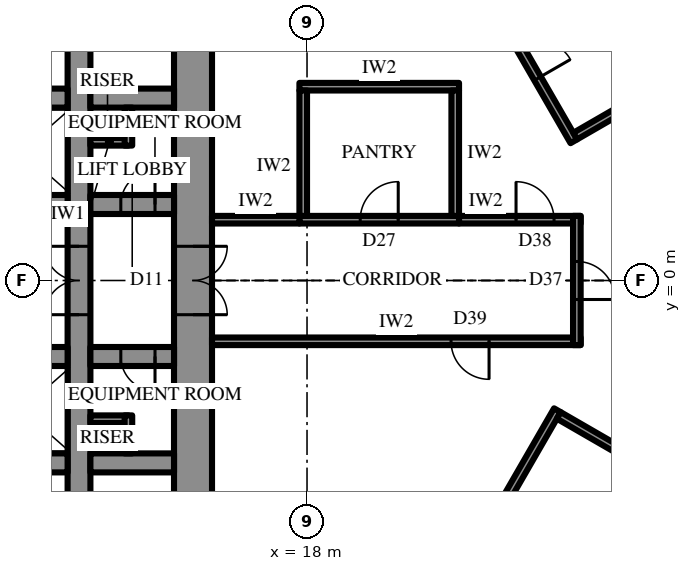
"""IFC4 building model, lengths in metres.
Left out: names, types, materials, properties, quantities, classifications, styles, units other than length and angle.
Written with IfcOpenShell. Run it as: python <this file> out.ifc"""

import sys

from ifc_helpers import new_model, si_unit, direction, frame, frame_2d, origin, place, context, subcontext, project, spatial, rectangle, extrude, element, fill, save


model = new_model("IFC4")
c1 = context("Model", 3, precision=1e-05, world=origin(), true_north=direction((0.0, 1.0)))
c2 = subcontext(c1, "Body", "Model", "MODEL_VIEW")
j1 = project(units=[si_unit("LENGTHUNIT", "METRE"), si_unit("PLANEANGLEUNIT", "RADIAN")], contexts=[c1])
p1 = place(None, origin())
s1 = spatial("IfcSite", under=j1, at=p1, CompositionType="ELEMENT")
p2 = place(p1, origin())
s2 = spatial("IfcBuilding", under=s1, at=p2, CompositionType="ELEMENT")
p3 = place(p2, frame((0.0, 0.0, 261.7)))
s3 = spatial("IfcBuildingStorey", under=s2, at=p3, CompositionType="ELEMENT", Elevation=261.7)
p4 = place(p3, frame((15.0, -10.7, 0.0), z_axis=(0.0, 0.0, 1.0), x_axis=(0.0, 1.0, 0.0)))
e1 = element("IfcWall", 1, at=p4, inside=s3, PredefinedType="SHEAR", context=c2, shape_type="SweptSolid", body=[
    extrude(rectangle(XDim=21.4, YDim=1.0, at=frame_2d((10.7, 0.0))), origin(), (0.0, 0.0, 1.0), 4.2),
])
p5 = place(p4, frame((9.8, 0.0, 0.0)))
e2 = element("IfcOpeningElement", 2, at=p5, cuts=e1, PredefinedType="OPENING", context=c2, shape_type="SweptSolid", body=[
    extrude(rectangle(XDim=1.8, YDim=2.4, at=frame_2d((0.9, 1.2))), frame((0.0, 0.51, 0.0), z_axis=(0.0, -1.0, 0.0), x_axis=(1.0, 0.0, 0.0)), (0.0, 0.0, 1.0), 1.02),
])
p6 = place(p3, frame((12.0, -10.7, 0.0), z_axis=(0.0, 0.0, 1.0), x_axis=(0.0, 1.0, 0.0)))
e3 = element("IfcWall", 3, at=p6, inside=s3, PredefinedType="SHEAR", context=c2, shape_type="SweptSolid", body=[
    extrude(rectangle(XDim=21.4, YDim=0.6, at=frame_2d((10.7, 0.0))), origin(), (0.0, 0.0, 1.0), 4.2),
])
p7 = place(p6, frame((9.8, 0.0, 0.0)))
e4 = element("IfcOpeningElement", 4, at=p7, cuts=e3, PredefinedType="OPENING", context=c2, shape_type="SweptSolid", body=[
    extrude(rectangle(XDim=1.8, YDim=2.4, at=frame_2d((0.9, 1.2))), frame((0.0, 0.31, 0.0), z_axis=(0.0, -1.0, 0.0), x_axis=(1.0, 0.0, 0.0)), (0.0, 0.0, 1.0), 0.62),
])
p8 = place(p3, frame((-3.2, 2.0, 0.0), z_axis=(0.0, 0.0, 1.0), x_axis=(1.0, 0.0, 0.0)))
e5 = element("IfcWall", 5, at=p8, inside=s3, PredefinedType="SHEAR", context=c2, shape_type="SweptSolid", body=[
    extrude(rectangle(XDim=14.9, YDim=0.5, at=frame_2d((7.45, 0.0))), origin(), (0.0, 0.0, 1.0), 4.2),
])
p9 = place(p8, frame((1.15, 0.0, 0.0)))
e6 = element("IfcOpeningElement", 6, at=p9, cuts=e5, PredefinedType="OPENING", context=c2, shape_type="SweptSolid", body=[
    extrude(rectangle(XDim=1.1, YDim=2.2, at=frame_2d((0.55, 1.1))), frame((0.0, 0.26, 0.0), z_axis=(0.0, -1.0, 0.0), x_axis=(1.0, 0.0, 0.0)), (0.0, 0.0, 1.0), 0.52),
])
p10 = place(p8, frame((4.15, 0.0, 0.0)))
e7 = element("IfcOpeningElement", 7, at=p10, cuts=e5, PredefinedType="OPENING", context=c2, shape_type="SweptSolid", body=[
    extrude(rectangle(XDim=1.1, YDim=2.2, at=frame_2d((0.55, 1.1))), frame((0.0, 0.26, 0.0), z_axis=(0.0, -1.0, 0.0), x_axis=(1.0, 0.0, 0.0)), (0.0, 0.0, 1.0), 0.52),
])
p11 = place(p8, frame((7.15, 0.0, 0.0)))
e8 = element("IfcOpeningElement", 8, at=p11, cuts=e5, PredefinedType="OPENING", context=c2, shape_type="SweptSolid", body=[
    extrude(rectangle(XDim=1.1, YDim=2.2, at=frame_2d((0.55, 1.1))), frame((0.0, 0.26, 0.0), z_axis=(0.0, -1.0, 0.0), x_axis=(1.0, 0.0, 0.0)), (0.0, 0.0, 1.0), 0.52),
])
p12 = place(p8, frame((10.15, 0.0, 0.0)))
e9 = element("IfcOpeningElement", 9, at=p12, cuts=e5, PredefinedType="OPENING", context=c2, shape_type="SweptSolid", body=[
    extrude(rectangle(XDim=1.1, YDim=2.2, at=frame_2d((0.55, 1.1))), frame((0.0, 0.26, 0.0), z_axis=(0.0, -1.0, 0.0), x_axis=(1.0, 0.0, 0.0)), (0.0, 0.0, 1.0), 0.52),
])
p13 = place(p3, frame((12.3, 2.0, 0.0), z_axis=(0.0, 0.0, 1.0), x_axis=(1.0, 0.0, 0.0)))
e10 = element("IfcWall", 10, at=p13, inside=s3, PredefinedType="SHEAR", context=c2, shape_type="SweptSolid", body=[
    extrude(rectangle(XDim=2.2, YDim=0.5, at=frame_2d((1.1, 0.0))), origin(), (0.0, 0.0, 1.0), 4.2),
])
p14 = place(p13, frame((0.8, 0.0, 0.0)))
e11 = element("IfcOpeningElement", 11, at=p14, cuts=e10, PredefinedType="OPENING", context=c2, shape_type="SweptSolid", body=[
    extrude(rectangle(XDim=0.9, YDim=2.2, at=frame_2d((0.45, 1.1))), frame((0.0, 0.26, 0.0), z_axis=(0.0, -1.0, 0.0), x_axis=(1.0, 0.0, 0.0)), (0.0, 0.0, 1.0), 0.52),
])
p15 = place(p3, frame((-11.7, 4.8, 0.0), z_axis=(0.0, 0.0, 1.0), x_axis=(1.0, 0.0, 0.0)))
e12 = element("IfcWall", 12, at=p15, inside=s3, PredefinedType="SHEAR", context=c2, shape_type="SweptSolid", body=[
    extrude(rectangle(XDim=23.4, YDim=0.5, at=frame_2d((11.7, 0.0))), origin(), (0.0, 0.0, 1.0), 4.2),
])
p16 = place(p15, frame((6.6, 0.0, 0.0)))
e13 = element("IfcOpeningElement", 13, at=p16, cuts=e12, PredefinedType="OPENING", context=c2, shape_type="SweptSolid", body=[
    extrude(rectangle(XDim=1.2, YDim=2.2, at=frame_2d((0.6, 1.1))), frame((0.0, 0.26, 0.0), z_axis=(0.0, -1.0, 0.0), x_axis=(1.0, 0.0, 0.0)), (0.0, 0.0, 1.0), 0.52),
])
p17 = place(p15, frame((3.6, 0.0, 0.0)))
e14 = element("IfcOpeningElement", 14, at=p17, cuts=e12, PredefinedType="OPENING", context=c2, shape_type="SweptSolid", body=[
    extrude(rectangle(XDim=1.2, YDim=2.2, at=frame_2d((0.6, 1.1))), frame((0.0, 0.26, 0.0), z_axis=(0.0, -1.0, 0.0), x_axis=(1.0, 0.0, 0.0)), (0.0, 0.0, 1.0), 0.52),
])
p18 = place(p3, frame((12.3, 4.8, 0.0), z_axis=(0.0, 0.0, 1.0), x_axis=(1.0, 0.0, 0.0)))
e15 = element("IfcWall", 15, at=p18, inside=s3, PredefinedType="SHEAR", context=c2, shape_type="SweptSolid", body=[
    extrude(rectangle(XDim=2.2, YDim=0.5, at=frame_2d((1.1, 0.0))), origin(), (0.0, 0.0, 1.0), 4.2),
])
p19 = place(p3, frame((14.5, -2.0, 0.0), z_axis=(0.0, 0.0, 1.0), x_axis=(-1.0, 0.0, 0.0)))
e16 = element("IfcWall", 16, at=p19, inside=s3, PredefinedType="SHEAR", context=c2, shape_type="SweptSolid", body=[
    extrude(rectangle(XDim=2.2, YDim=0.5, at=frame_2d((1.1, 0.0))), origin(), (0.0, 0.0, 1.0), 4.2),
])
p20 = place(p19, frame((0.5, 0.0, 0.0)))
e17 = element("IfcOpeningElement", 17, at=p20, cuts=e16, PredefinedType="OPENING", context=c2, shape_type="SweptSolid", body=[
    extrude(rectangle(XDim=0.9, YDim=2.2, at=frame_2d((0.45, 1.1))), frame((0.0, 0.26, 0.0), z_axis=(0.0, -1.0, 0.0), x_axis=(1.0, 0.0, 0.0)), (0.0, 0.0, 1.0), 0.52),
])
p21 = place(p3, frame((11.7, -2.0, 0.0), z_axis=(0.0, 0.0, 1.0), x_axis=(-1.0, 0.0, 0.0)))
e18 = element("IfcWall", 18, at=p21, inside=s3, PredefinedType="SHEAR", context=c2, shape_type="SweptSolid", body=[
    extrude(rectangle(XDim=5.9, YDim=0.5, at=frame_2d((2.95, 0.0))), origin(), (0.0, 0.0, 1.0), 4.2),
])
p22 = place(p3, frame((14.5, -4.8, 0.0), z_axis=(0.0, 0.0, 1.0), x_axis=(-1.0, 0.0, 0.0)))
e19 = element("IfcWall", 19, at=p22, inside=s3, PredefinedType="SHEAR", context=c2, shape_type="SweptSolid", body=[
    extrude(rectangle(XDim=2.2, YDim=0.5, at=frame_2d((1.1, 0.0))), origin(), (0.0, 0.0, 1.0), 4.2),
])
p23 = place(p3, frame((11.7, -4.8, 0.0), z_axis=(0.0, 0.0, 1.0), x_axis=(-1.0, 0.0, 0.0)))
e20 = element("IfcWall", 20, at=p23, inside=s3, PredefinedType="SHEAR", context=c2, shape_type="SweptSolid", body=[
    extrude(rectangle(XDim=23.4, YDim=0.5, at=frame_2d((11.7, 0.0))), origin(), (0.0, 0.0, 1.0), 4.2),
])
p24 = place(p23, frame((6.6, 0.0, 0.0)))
e21 = element("IfcOpeningElement", 21, at=p24, cuts=e20, PredefinedType="OPENING", context=c2, shape_type="SweptSolid", body=[
    extrude(rectangle(XDim=1.2, YDim=2.2, at=frame_2d((0.6, 1.1))), frame((0.0, 0.26, 0.0), z_axis=(0.0, -1.0, 0.0), x_axis=(1.0, 0.0, 0.0)), (0.0, 0.0, 1.0), 0.52),
])
p25 = place(p23, frame((3.6, 0.0, 0.0)))
e22 = element("IfcOpeningElement", 22, at=p25, cuts=e20, PredefinedType="OPENING", context=c2, shape_type="SweptSolid", body=[
    extrude(rectangle(XDim=1.2, YDim=2.2, at=frame_2d((0.6, 1.1))), frame((0.0, 0.26, 0.0), z_axis=(0.0, -1.0, 0.0), x_axis=(1.0, 0.0, 0.0)), (0.0, 0.0, 1.0), 0.52),
])
p26 = place(p3, frame((18.707, -25.299, 0.0), z_axis=(0.0, 0.0, 1.0), x_axis=(0.500000442367, 0.866025148383, 0.0)))
e23 = element("IfcWall", 23, at=p26, inside=s3, PredefinedType="SOLIDWALL", context=c2, shape_type="SweptSolid", body=[
    extrude(rectangle(XDim=25.113, YDim=0.3, at=frame_2d((12.556, 0.0))), origin(), (0.0, 0.0, 1.0), 2.8),
])
p27 = place(p26, frame((4.278, 0.0, 0.6)))
e24 = element("IfcOpeningElement", 24, at=p27, cuts=e23, PredefinedType="OPENING", context=c2, shape_type="SweptSolid", body=[
    extrude(rectangle(XDim=2.7, YDim=1.95, at=frame_2d((1.35, 0.975))), frame((0.0, 0.16, 0.0), z_axis=(0.0, -1.0, 0.0), x_axis=(1.0, 0.0, 0.0)), (0.0, 0.0, 1.0), 0.32),
])
p28 = place(p26, frame((9.647, 0.0, 0.0)))
e25 = element("IfcOpeningElement", 25, at=p28, cuts=e23, PredefinedType="OPENING", context=c2, shape_type="SweptSolid", body=[
    extrude(rectangle(XDim=1.2, YDim=2.4, at=frame_2d((0.6, 1.2))), frame((0.0, 0.16, 0.0), z_axis=(0.0, -1.0, 0.0), x_axis=(1.0, 0.0, 0.0)), (0.0, 0.0, 1.0), 0.32),
])
p29 = place(p26, frame((13.516, 0.0, 0.6)))
e26 = element("IfcOpeningElement", 26, at=p29, cuts=e23, PredefinedType="OPENING", context=c2, shape_type="SweptSolid", body=[
    extrude(rectangle(XDim=2.7, YDim=1.95, at=frame_2d((1.35, 0.975))), frame((0.0, 0.16, 0.0), z_axis=(0.0, -1.0, 0.0), x_axis=(1.0, 0.0, 0.0)), (0.0, 0.0, 1.0), 0.32),
])
p30 = place(p26, frame((18.135, 0.0, 0.6)))
e27 = element("IfcOpeningElement", 27, at=p30, cuts=e23, PredefinedType="OPENING", context=c2, shape_type="SweptSolid", body=[
    extrude(rectangle(XDim=2.7, YDim=1.95, at=frame_2d((1.35, 0.975))), frame((0.0, 0.16, 0.0), z_axis=(0.0, -1.0, 0.0), x_axis=(1.0, 0.0, 0.0)), (0.0, 0.0, 1.0), 0.32),
])
for number, where, z_axis, x_axis in (
    (28, (12.3, 3.65, 0.0), (0.0, 0.0, 1.0), (1.0, 0.0, 0.0)),
    (29, (13.3, 3.55, 0.0), (0.0, 0.0, 1.0), (0.0, 1.0, 0.0)),
    (30, (13.3, -3.65, 0.0), (0.0, 0.0, 1.0), (-1.0, 0.0, 0.0)),
    (31, (13.3, -3.55, 0.0), (0.0, 0.0, 1.0), (0.0, -1.0, 0.0)),
):
    element("IfcWall", number, at=place(p3, frame(where, z_axis=z_axis, x_axis=x_axis)), inside=s3, PredefinedType="PARTITIONING", context=c2, shape_type="SweptSolid", body=[
        extrude(rectangle(XDim=1.0, YDim=0.2, at=frame_2d((0.5, 0.0))), origin(), (0.0, 0.0, 1.0), 4.0),
    ])
p31 = place(p3, frame((25.021, 3.663, 0.0), z_axis=(0.0, 0.0, 1.0), x_axis=(-0.500002095642, 0.866024193862, 0.0)))
e32 = element("IfcWall", 32, at=p31, inside=s3, PredefinedType="PARTITIONING", context=c2, shape_type="SweptSolid", body=[
    extrude(rectangle(XDim=14.057, YDim=0.2, at=frame_2d((7.028, 0.0))), origin(), (0.0, 0.0, 1.0), 4.0),
])
p32 = place(p31, frame((1.909, 0.0, 0.0)))
e33 = element("IfcOpeningElement", 33, at=p32, cuts=e32, PredefinedType="OPENING", context=c2, shape_type="SweptSolid", body=[
    extrude(rectangle(XDim=1.0, YDim=2.2, at=frame_2d((0.5, 1.1))), frame((0.0, 0.11, 0.0), z_axis=(0.0, -1.0, 0.0), x_axis=(1.0, 0.0, 0.0)), (0.0, 0.0, 1.0), 0.22),
])
p33 = place(p3, frame((25.057, 3.8, 0.0), z_axis=(0.0, 0.0, 1.0), x_axis=(0.866028703517, 0.499994284652, 0.0)))
e34 = element("IfcWall", 34, at=p33, inside=s3, PredefinedType="PARTITIONING", context=c2, shape_type="SweptSolid", body=[
    extrude(rectangle(XDim=4.25, YDim=0.2, at=frame_2d((2.125, 0.0))), origin(), (0.0, 0.0, 1.0), 3.082),
])
p34 = place(p3, frame((19.869, -11.587, 0.0), z_axis=(0.0, 0.0, 1.0), x_axis=(0.499989672313, 0.866031366395, 0.0)))
e35 = element("IfcWall", 35, at=p34, inside=s3, PredefinedType="PARTITIONING", context=c2, shape_type="SweptSolid", body=[
    extrude(rectangle(XDim=9.438, YDim=0.2, at=frame_2d((4.719, 0.0))), origin(), (0.0, 0.0, 1.0), 4.0),
])
p35 = place(p34, frame((1.909, 0.0, 0.0)))
e36 = element("IfcOpeningElement", 36, at=p35, cuts=e35, PredefinedType="OPENING", context=c2, shape_type="SweptSolid", body=[
    extrude(rectangle(XDim=1.0, YDim=2.2, at=frame_2d((0.5, 1.1))), frame((0.0, 0.11, 0.0), z_axis=(0.0, -1.0, 0.0), x_axis=(1.0, 0.0, 0.0)), (0.0, 0.0, 1.0), 0.22),
])
p36 = place(p3, frame((24.624, -3.55, 0.0), z_axis=(0.0, 0.0, 1.0), x_axis=(0.866020389056, -0.500008685663, 0.0)))
e37 = element("IfcWall", 37, at=p36, inside=s3, PredefinedType="PARTITIONING", context=c2, shape_type="SweptSolid", body=[
    extrude(rectangle(XDim=4.75, YDim=0.2, at=frame_2d((2.375, 0.0))), origin(), (0.0, 0.0, 1.0), 3.082),
])
p37 = place(p3, frame((17.8, 1.6, 0.0), z_axis=(0.0, 0.0, 1.0), x_axis=(1.0, 0.0, 0.0)))
e38 = element("IfcWall", 38, at=p37, inside=s3, PredefinedType="PARTITIONING", context=c2, shape_type="SweptSolid", body=[
    extrude(rectangle(XDim=4.2, YDim=0.2, at=frame_2d((2.1, 0.0))), origin(), (0.0, 0.0, 1.0), 4.0),
])
p38 = place(p37, frame((1.6, 0.0, 0.0)))
e39 = element("IfcOpeningElement", 39, at=p38, cuts=e38, PredefinedType="OPENING", context=c2, shape_type="SweptSolid", body=[
    extrude(rectangle(XDim=1.0, YDim=2.2, at=frame_2d((0.5, 1.1))), frame((0.0, 0.11, 0.0), z_axis=(0.0, -1.0, 0.0), x_axis=(1.0, 0.0, 0.0)), (0.0, 0.0, 1.0), 0.22),
])
p39 = place(p3, frame((17.8, 5.1, 0.0), z_axis=(0.0, 0.0, 1.0), x_axis=(1.0, 0.0, 0.0)))
e40 = element("IfcWall", 40, at=p39, inside=s3, PredefinedType="PARTITIONING", context=c2, shape_type="SweptSolid", body=[
    extrude(rectangle(XDim=4.2, YDim=0.2, at=frame_2d((2.1, 0.0))), origin(), (0.0, 0.0, 1.0), 4.0),
])
for number, where, z_axis, x_axis in (
    (41, (17.9, 1.7, 0.0), (0.0, 0.0, 1.0), (0.0, 1.0, 0.0)),
    (42, (21.9, 1.7, 0.0), (0.0, 0.0, 1.0), (0.0, 1.0, 0.0)),
):
    element("IfcWall", number, at=place(p3, frame(where, z_axis=z_axis, x_axis=x_axis)), inside=s3, PredefinedType="PARTITIONING", context=c2, shape_type="SweptSolid", body=[
        extrude(rectangle(XDim=3.3, YDim=0.2, at=frame_2d((1.65, 0.0))), origin(), (0.0, 0.0, 1.0), 4.0),
    ])
p40 = place(p3, frame((15.5, 1.6, 0.0), z_axis=(0.0, 0.0, 1.0), x_axis=(1.0, 0.0, 0.0)))
e43 = element("IfcWall", 43, at=p40, inside=s3, PredefinedType="PARTITIONING", context=c2, shape_type="SweptSolid", body=[
    extrude(rectangle(XDim=2.3, YDim=0.2, at=frame_2d((1.15, 0.0))), origin(), (0.0, 0.0, 1.0), 4.0),
])
p41 = place(p3, frame((22.0, 1.6, 0.0), z_axis=(0.0, 0.0, 1.0), x_axis=(1.0, 0.0, 0.0)))
e44 = element("IfcWall", 44, at=p41, inside=s3, PredefinedType="PARTITIONING", context=c2, shape_type="SweptSolid", body=[
    extrude(rectangle(XDim=3.2, YDim=0.2, at=frame_2d((1.6, 0.0))), origin(), (0.0, 0.0, 1.0), 4.0),
])
p42 = place(p41, frame((1.5, 0.0, 0.0)))
e45 = element("IfcOpeningElement", 45, at=p42, cuts=e44, PredefinedType="OPENING", context=c2, shape_type="SweptSolid", body=[
    extrude(rectangle(XDim=1.0, YDim=2.2, at=frame_2d((0.5, 1.1))), frame((0.0, 0.11, 0.0), z_axis=(0.0, -1.0, 0.0), x_axis=(1.0, 0.0, 0.0)), (0.0, 0.0, 1.0), 0.22),
])
p43 = place(p3, frame((15.5, -1.6, 0.0), z_axis=(0.0, 0.0, 1.0), x_axis=(1.0, 0.0, 0.0)))
e46 = element("IfcWall", 46, at=p43, inside=s3, PredefinedType="PARTITIONING", context=c2, shape_type="SweptSolid", body=[
    extrude(rectangle(XDim=9.7, YDim=0.2, at=frame_2d((4.85, 0.0))), origin(), (0.0, 0.0, 1.0), 4.0),
])
p44 = place(p43, frame((6.29, 0.0, 0.0)))
e47 = element("IfcOpeningElement", 47, at=p44, cuts=e46, PredefinedType="OPENING", context=c2, shape_type="SweptSolid", body=[
    extrude(rectangle(XDim=1.0, YDim=2.2, at=frame_2d((0.5, 1.1))), frame((0.0, 0.11, 0.0), z_axis=(0.0, -1.0, 0.0), x_axis=(1.0, 0.0, 0.0)), (0.0, 0.0, 1.0), 0.22),
])
p45 = place(p3, frame((25.1, -1.7, 0.0), z_axis=(0.0, 0.0, 1.0), x_axis=(0.0, 1.0, 0.0)))
e48 = element("IfcWall", 48, at=p45, inside=s3, PredefinedType="PARTITIONING", context=c2, shape_type="SweptSolid", body=[
    extrude(rectangle(XDim=3.4, YDim=0.2, at=frame_2d((1.7, 0.0))), origin(), (0.0, 0.0, 1.0), 4.0),
])
p46 = place(p45, frame((1.2, 0.0, 0.0)))
e49 = element("IfcOpeningElement", 49, at=p46, cuts=e48, PredefinedType="OPENING", context=c2, shape_type="SweptSolid", body=[
    extrude(rectangle(XDim=1.0, YDim=2.2, at=frame_2d((0.5, 1.1))), frame((0.0, 0.11, 0.0), z_axis=(0.0, -1.0, 0.0), x_axis=(1.0, 0.0, 0.0)), (0.0, 0.0, 1.0), 0.22),
])
p47 = place(p5, frame((1.8, 0.0, 0.0), z_axis=(0.0, 0.0, 1.0), x_axis=(-1.0, 0.0, 0.0)))
e50 = element("IfcDoor", 50, at=p47, inside=s3, OperationType="DOUBLE_DOOR_SINGLE_SWING", PredefinedType="DOOR", context=c2, shape_type="SweptSolid", body=[
    extrude(rectangle(XDim=1.8, YDim=2.4, at=frame_2d((0.9, 1.2))), frame((0.0, 0.025, 0.0), z_axis=(0.0, -1.0, 0.0), x_axis=(1.0, 0.0, 0.0)), (0.0, 0.0, 1.0), 0.05),
])
fill(e2, e50)
p48 = place(p14, origin())
e51 = element("IfcDoor", 51, at=p48, inside=s3, OperationType="SINGLE_SWING_LEFT", PredefinedType="DOOR", context=c2, shape_type="SweptSolid", body=[
    extrude(rectangle(XDim=0.9, YDim=2.2, at=frame_2d((0.45, 1.1))), frame((0.0, 0.025, 0.0), z_axis=(0.0, -1.0, 0.0), x_axis=(1.0, 0.0, 0.0)), (0.0, 0.0, 1.0), 0.05),
])
fill(e11, e51)
p49 = place(p20, origin())
e52 = element("IfcDoor", 52, at=p49, inside=s3, OperationType="SINGLE_SWING_RIGHT", PredefinedType="DOOR", context=c2, shape_type="SweptSolid", body=[
    extrude(rectangle(XDim=0.9, YDim=2.2, at=frame_2d((0.45, 1.1))), frame((0.0, 0.025, 0.0), z_axis=(0.0, -1.0, 0.0), x_axis=(1.0, 0.0, 0.0)), (0.0, 0.0, 1.0), 0.05),
])
fill(e17, e52)
p50 = place(p7, origin())
e53 = element("IfcDoor", 53, at=p50, inside=s3, OperationType="DOUBLE_DOOR_SINGLE_SWING", PredefinedType="DOOR", context=c2, shape_type="SweptSolid", body=[
    extrude(rectangle(XDim=1.8, YDim=2.4, at=frame_2d((0.9, 1.2))), frame((0.0, 0.025, 0.0), z_axis=(0.0, -1.0, 0.0), x_axis=(1.0, 0.0, 0.0)), (0.0, 0.0, 1.0), 0.05),
])
fill(e4, e53)
p51 = place(p32, frame((1.0, 0.0, 0.0), z_axis=(0.0, 0.0, 1.0), x_axis=(-1.0, 0.0, 0.0)))
e54 = element("IfcDoor", 54, at=p51, inside=s3, OperationType="SINGLE_SWING_LEFT", PredefinedType="DOOR", context=c2, shape_type="SweptSolid", body=[
    extrude(rectangle(XDim=1.0, YDim=2.2, at=frame_2d((0.5, 1.1))), frame((0.0, 0.025, 0.0), z_axis=(0.0, -1.0, 0.0), x_axis=(1.0, 0.0, 0.0)), (0.0, 0.0, 1.0), 0.05),
])
fill(e33, e54)
p52 = place(p38, origin())
e55 = element("IfcDoor", 55, at=p52, inside=s3, OperationType="SINGLE_SWING_LEFT", PredefinedType="DOOR", context=c2, shape_type="SweptSolid", body=[
    extrude(rectangle(XDim=1.0, YDim=2.2, at=frame_2d((0.5, 1.1))), frame((0.0, 0.025, 0.0), z_axis=(0.0, -1.0, 0.0), x_axis=(1.0, 0.0, 0.0)), (0.0, 0.0, 1.0), 0.05),
])
fill(e39, e55)
p53 = place(p42, origin())
e56 = element("IfcDoor", 56, at=p53, inside=s3, OperationType="SINGLE_SWING_RIGHT", PredefinedType="DOOR", context=c2, shape_type="SweptSolid", body=[
    extrude(rectangle(XDim=1.0, YDim=2.2, at=frame_2d((0.5, 1.1))), frame((0.0, 0.025, 0.0), z_axis=(0.0, -1.0, 0.0), x_axis=(1.0, 0.0, 0.0)), (0.0, 0.0, 1.0), 0.05),
])
fill(e45, e56)
p54 = place(p44, frame((1.0, 0.0, 0.0), z_axis=(0.0, 0.0, 1.0), x_axis=(-1.0, 0.0, 0.0)))
e57 = element("IfcDoor", 57, at=p54, inside=s3, OperationType="SINGLE_SWING_RIGHT", PredefinedType="DOOR", context=c2, shape_type="SweptSolid", body=[
    extrude(rectangle(XDim=1.0, YDim=2.2, at=frame_2d((0.5, 1.1))), frame((0.0, 0.025, 0.0), z_axis=(0.0, -1.0, 0.0), x_axis=(1.0, 0.0, 0.0)), (0.0, 0.0, 1.0), 0.05),
])
fill(e47, e57)
p55 = place(p46, frame((1.0, 0.0, 0.0), z_axis=(0.0, 0.0, 1.0), x_axis=(-1.0, 0.0, 0.0)))
e58 = element("IfcDoor", 58, at=p55, inside=s3, OperationType="SINGLE_SWING_LEFT", PredefinedType="DOOR", context=c2, shape_type="SweptSolid", body=[
    extrude(rectangle(XDim=1.0, YDim=2.2, at=frame_2d((0.5, 1.1))), frame((0.0, 0.025, 0.0), z_axis=(0.0, -1.0, 0.0), x_axis=(1.0, 0.0, 0.0)), (0.0, 0.0, 1.0), 0.05),
])
fill(e49, e58)
save(model, sys.argv[1])
